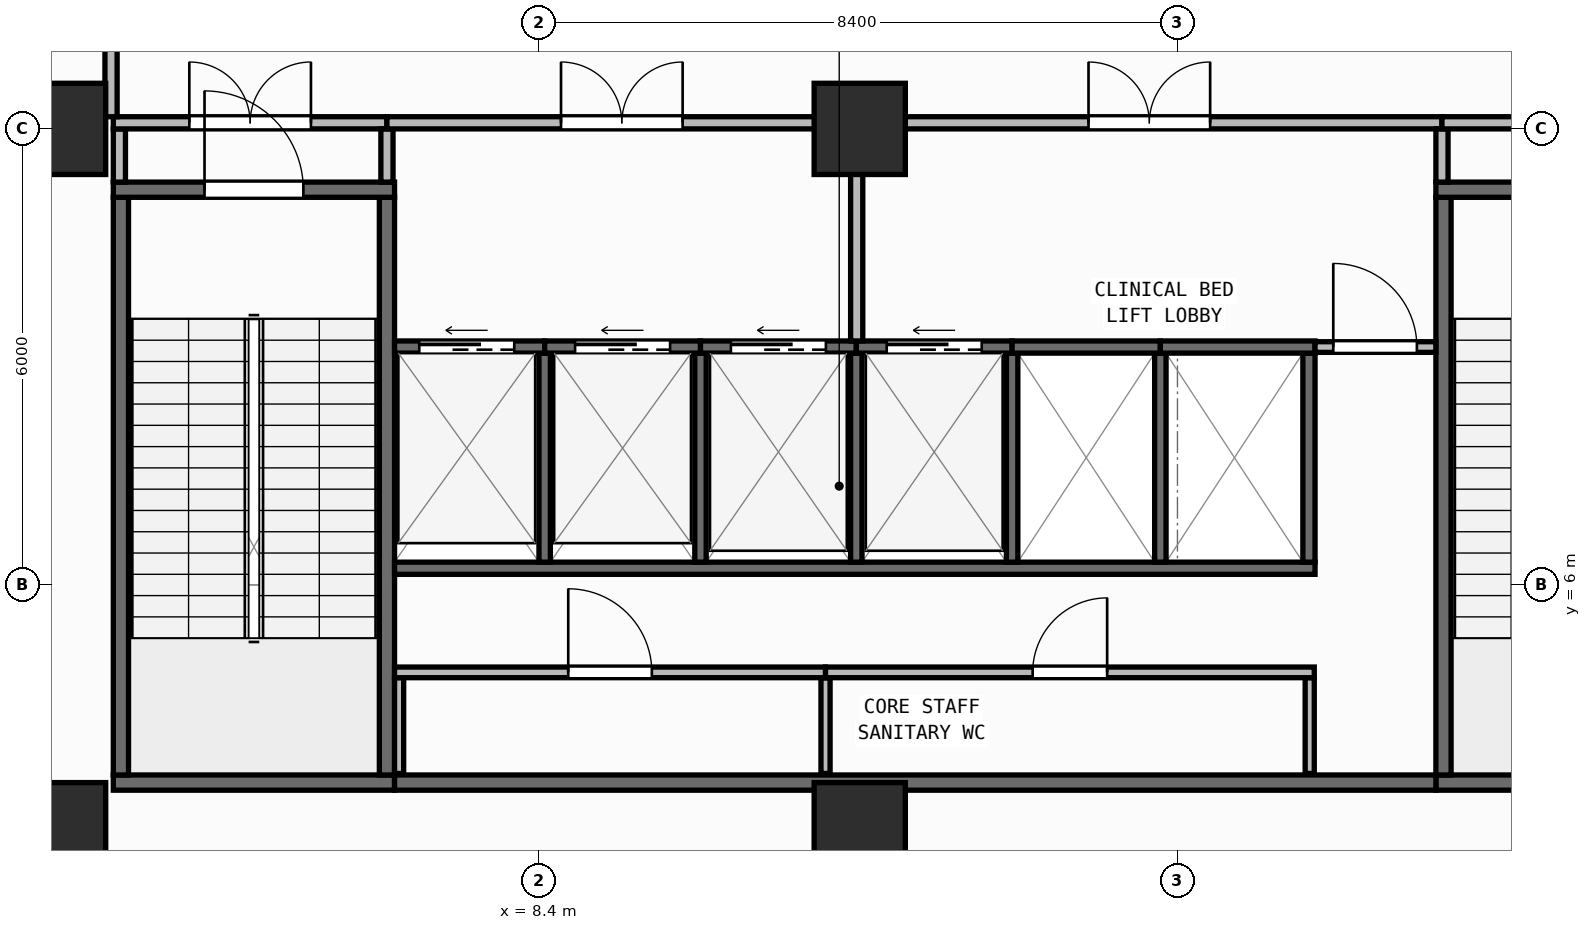
"""IFC4 building model, lengths in metres.
Left out: names, types, materials, properties, quantities, classifications, styles, units other than length and angle.
Written with IfcOpenShell. Run it as: python <this file> out.ifc"""

import sys

from ifc_helpers import new_model, si_unit, direction, frame, frame_2d, origin, origin_2d, place, context, subcontext, project, spatial, rectangle, extrude, element, fill, save


model = new_model("IFC4")
c1 = context("Model", 3, precision=1e-05, world=origin(), true_north=direction((0.0, 1.0)))
c2 = subcontext(c1, "Body", "Model", "MODEL_VIEW")
j1 = project(units=[si_unit("LENGTHUNIT", "METRE"), si_unit("PLANEANGLEUNIT", "RADIAN")], contexts=[c1])
p1 = place(None, origin())
s1 = spatial("IfcSite", under=j1, at=p1, CompositionType="ELEMENT")
p2 = place(p1, origin())
s2 = spatial("IfcBuilding", under=s1, at=p2, CompositionType="ELEMENT")
p3 = place(p2, frame((0.0, 0.0, 174.45)))
s3 = spatial("IfcBuildingStorey", under=s2, at=p3, CompositionType="ELEMENT", Elevation=174.45)
for number, where, z_axis, x_axis in (
    (1, (2.1, 2.8, 0.0), (0.0, 0.0, 1.0), (1.0, 0.0, 0.0)),
    (2, (12.62, 2.8, 0.0), (0.0, 0.0, 1.0), (1.0, 0.0, 0.0)),
    (3, (2.1, 12.0, 0.0), (0.0, 0.0, 1.0), (1.0, 0.0, 0.0)),
    (4, (12.62, 12.0, 0.0), (0.0, 0.0, 1.0), (1.0, 0.0, 0.0)),
):
    element("IfcColumn", number, at=place(p3, frame(where, z_axis=z_axis, x_axis=x_axis)), inside=s3, PredefinedType="COLUMN", context=c2, shape_type="SweptSolid", body=[
        extrude(rectangle(XDim=1.2, YDim=1.2, at=origin_2d()), origin(), (0.0, 0.0, 1.0), 5.8),
    ])
p4 = place(p3, frame((2.8, 3.4, 0.0), z_axis=(0.0, 0.0, 1.0), x_axis=(1.0, 0.0, 0.0)))
e5 = element("IfcWall", 5, at=p4, inside=s3, PredefinedType="SHEAR", context=c2, shape_type="SweptSolid", body=[
    extrude(rectangle(XDim=3.7, YDim=0.2, at=frame_2d((1.85, 0.0))), origin(), (0.0, 0.0, 1.0), 5.56),
])
for number, where, z_axis, x_axis in (
    (6, (2.9, 3.5, 0.0), (0.0, 0.0, 1.0), (0.0, 1.0, 0.0)),
    (7, (6.4, 3.5, 0.0), (0.0, 0.0, 1.0), (0.0, 1.0, 0.0)),
):
    element("IfcWall", number, at=place(p3, frame(where, z_axis=z_axis, x_axis=x_axis)), inside=s3, PredefinedType="SHEAR", context=c2, shape_type="SweptSolid", body=[
        extrude(rectangle(XDim=7.6, YDim=0.2, at=frame_2d((3.8, 0.0))), origin(), (0.0, 0.0, 1.0), 5.56),
    ])
p5 = place(p3, frame((2.8, 11.2, 0.0), z_axis=(0.0, 0.0, 1.0), x_axis=(1.0, 0.0, 0.0)))
e8 = element("IfcWall", 8, at=p5, inside=s3, PredefinedType="SHEAR", context=c2, shape_type="SweptSolid", body=[
    extrude(rectangle(XDim=3.7, YDim=0.2, at=frame_2d((1.85, 0.0))), origin(), (0.0, 0.0, 1.0), 5.56),
])
p6 = place(p5, frame((1.2, 0.0, 0.0)))
e9 = element("IfcOpeningElement", 9, at=p6, cuts=e8, PredefinedType="OPENING", context=c2, shape_type="SweptSolid", body=[
    extrude(rectangle(XDim=1.3, YDim=2.15, at=frame_2d((0.65, 1.075))), frame((0.0, 0.11, 0.0), z_axis=(0.0, -1.0, 0.0), x_axis=(1.0, 0.0, 0.0)), (0.0, 0.0, 1.0), 0.22),
])
p7 = place(p3, frame((20.2, 3.4, 0.0), z_axis=(0.0, 0.0, 1.0), x_axis=(1.0, 0.0, 0.0)))
e10 = element("IfcWall", 10, at=p7, inside=s3, PredefinedType="SHEAR", context=c2, shape_type="SweptSolid", body=[
    extrude(rectangle(XDim=3.7, YDim=0.2, at=frame_2d((1.85, 0.0))), origin(), (0.0, 0.0, 1.0), 5.56),
])
p8 = place(p3, frame((20.3, 3.5, 0.0), z_axis=(0.0, 0.0, 1.0), x_axis=(0.0, 1.0, 0.0)))
e11 = element("IfcWall", 11, at=p8, inside=s3, PredefinedType="SHEAR", context=c2, shape_type="SweptSolid", body=[
    extrude(rectangle(XDim=7.6, YDim=0.2, at=frame_2d((3.8, 0.0))), origin(), (0.0, 0.0, 1.0), 5.56),
])
p9 = place(p3, frame((20.2, 11.2, 0.0), z_axis=(0.0, 0.0, 1.0), x_axis=(1.0, 0.0, 0.0)))
e12 = element("IfcWall", 12, at=p9, inside=s3, PredefinedType="SHEAR", context=c2, shape_type="SweptSolid", body=[
    extrude(rectangle(XDim=3.7, YDim=0.2, at=frame_2d((1.85, 0.0))), origin(), (0.0, 0.0, 1.0), 5.56),
])
p10 = place(p9, frame((1.2, 0.0, 0.0)))
e13 = element("IfcOpeningElement", 13, at=p10, cuts=e12, PredefinedType="OPENING", context=c2, shape_type="SweptSolid", body=[
    extrude(rectangle(XDim=1.3, YDim=2.15, at=frame_2d((0.65, 1.075))), frame((0.0, 0.11, 0.0), z_axis=(0.0, -1.0, 0.0), x_axis=(1.0, 0.0, 0.0)), (0.0, 0.0, 1.0), 0.22),
])
p11 = place(p3, frame((6.5, 3.4, 0.0), z_axis=(0.0, 0.0, 1.0), x_axis=(1.0, 0.0, 0.0)))
e14 = element("IfcWall", 14, at=p11, inside=s3, PredefinedType="SHEAR", context=c2, shape_type="SweptSolid", body=[
    extrude(rectangle(XDim=13.7, YDim=0.2, at=frame_2d((6.85, 0.0))), origin(), (0.0, 0.0, 1.0), 5.56),
])
p12 = place(p3, frame((6.5, 6.22, 0.0), z_axis=(0.0, 0.0, 1.0), x_axis=(1.0, 0.0, 0.0)))
e15 = element("IfcWall", 15, at=p12, inside=s3, PredefinedType="SHEAR", context=c2, shape_type="SweptSolid", body=[
    extrude(rectangle(XDim=12.11, YDim=0.16, at=frame_2d((6.055, 0.0))), origin(), (0.0, 0.0, 1.0), 5.56),
])
p13 = place(p3, frame((18.53, 6.3, 0.0), z_axis=(0.0, 0.0, 1.0), x_axis=(0.0, 1.0, 0.0)))
e16 = element("IfcWall", 16, at=p13, inside=s3, PredefinedType="SHEAR", context=c2, shape_type="SweptSolid", body=[
    extrude(rectangle(XDim=2.75, YDim=0.16, at=frame_2d((1.375, 0.0))), origin(), (0.0, 0.0, 1.0), 5.56),
])
for number, where, z_axis, x_axis in (
    (17, (8.475, 6.3, 0.0), (0.0, 0.0, 1.0), (0.0, 1.0, 0.0)),
    (18, (10.525, 6.3, 0.0), (0.0, 0.0, 1.0), (0.0, 1.0, 0.0)),
    (19, (12.575, 6.3, 0.0), (0.0, 0.0, 1.0), (0.0, 1.0, 0.0)),
    (20, (14.625, 6.3, 0.0), (0.0, 0.0, 1.0), (0.0, 1.0, 0.0)),
    (21, (16.575, 6.3, 0.0), (0.0, 0.0, 1.0), (0.0, 1.0, 0.0)),
):
    element("IfcWall", number, at=place(p3, frame(where, z_axis=z_axis, x_axis=x_axis)), inside=s3, PredefinedType="SHEAR", context=c2, shape_type="SweptSolid", body=[
        extrude(rectangle(XDim=2.75, YDim=0.15, at=frame_2d((1.375, 0.0))), origin(), (0.0, 0.0, 1.0), 5.56),
    ])
p14 = place(p3, frame((6.5, 9.13, 0.0), z_axis=(0.0, 0.0, 1.0), x_axis=(1.0, 0.0, 0.0)))
e22 = element("IfcWall", 22, at=p14, inside=s3, PredefinedType="SHEAR", context=c2, shape_type="SweptSolid", body=[
    extrude(rectangle(XDim=1.975, YDim=0.16, at=frame_2d((0.988, 0.0))), origin(), (0.0, 0.0, 1.0), 5.56),
])
p15 = place(p14, frame((0.325, 0.0, 0.0)))
e23 = element("IfcOpeningElement", 23, at=p15, cuts=e22, PredefinedType="OPENING", context=c2, shape_type="SweptSolid", body=[
    extrude(rectangle(XDim=1.25, YDim=2.15, at=frame_2d((0.625, 1.075))), frame((0.0, 0.09, 0.0), z_axis=(0.0, -1.0, 0.0), x_axis=(1.0, 0.0, 0.0)), (0.0, 0.0, 1.0), 0.18),
])
p16 = place(p3, frame((8.475, 9.13, 0.0), z_axis=(0.0, 0.0, 1.0), x_axis=(1.0, 0.0, 0.0)))
e24 = element("IfcWall", 24, at=p16, inside=s3, PredefinedType="SHEAR", context=c2, shape_type="SweptSolid", body=[
    extrude(rectangle(XDim=2.05, YDim=0.16, at=frame_2d((1.025, 0.0))), origin(), (0.0, 0.0, 1.0), 5.56),
])
p17 = place(p16, frame((0.4, 0.0, 0.0)))
e25 = element("IfcOpeningElement", 25, at=p17, cuts=e24, PredefinedType="OPENING", context=c2, shape_type="SweptSolid", body=[
    extrude(rectangle(XDim=1.25, YDim=2.15, at=frame_2d((0.625, 1.075))), frame((0.0, 0.09, 0.0), z_axis=(0.0, -1.0, 0.0), x_axis=(1.0, 0.0, 0.0)), (0.0, 0.0, 1.0), 0.18),
])
p18 = place(p3, frame((10.525, 9.13, 0.0), z_axis=(0.0, 0.0, 1.0), x_axis=(1.0, 0.0, 0.0)))
e26 = element("IfcWall", 26, at=p18, inside=s3, PredefinedType="SHEAR", context=c2, shape_type="SweptSolid", body=[
    extrude(rectangle(XDim=2.05, YDim=0.16, at=frame_2d((1.025, 0.0))), origin(), (0.0, 0.0, 1.0), 5.56),
])
p19 = place(p18, frame((0.4, 0.0, 0.0)))
e27 = element("IfcOpeningElement", 27, at=p19, cuts=e26, PredefinedType="OPENING", context=c2, shape_type="SweptSolid", body=[
    extrude(rectangle(XDim=1.25, YDim=2.15, at=frame_2d((0.625, 1.075))), frame((0.0, 0.09, 0.0), z_axis=(0.0, -1.0, 0.0), x_axis=(1.0, 0.0, 0.0)), (0.0, 0.0, 1.0), 0.18),
])
p20 = place(p3, frame((12.575, 9.13, 0.0), z_axis=(0.0, 0.0, 1.0), x_axis=(1.0, 0.0, 0.0)))
e28 = element("IfcWall", 28, at=p20, inside=s3, PredefinedType="SHEAR", context=c2, shape_type="SweptSolid", body=[
    extrude(rectangle(XDim=2.05, YDim=0.16, at=frame_2d((1.025, 0.0))), origin(), (0.0, 0.0, 1.0), 5.56),
])
p21 = place(p20, frame((0.4, 0.0, 0.0)))
e29 = element("IfcOpeningElement", 29, at=p21, cuts=e28, PredefinedType="OPENING", context=c2, shape_type="SweptSolid", body=[
    extrude(rectangle(XDim=1.25, YDim=2.15, at=frame_2d((0.625, 1.075))), frame((0.0, 0.09, 0.0), z_axis=(0.0, -1.0, 0.0), x_axis=(1.0, 0.0, 0.0)), (0.0, 0.0, 1.0), 0.18),
])
p22 = place(p3, frame((14.625, 9.13, 0.0), z_axis=(0.0, 0.0, 1.0), x_axis=(1.0, 0.0, 0.0)))
e30 = element("IfcWall", 30, at=p22, inside=s3, PredefinedType="SHEAR", context=c2, shape_type="SweptSolid", body=[
    extrude(rectangle(XDim=1.95, YDim=0.16, at=frame_2d((0.975, 0.0))), origin(), (0.0, 0.0, 1.0), 5.56),
])
p23 = place(p3, frame((16.575, 9.13, 0.0), z_axis=(0.0, 0.0, 1.0), x_axis=(1.0, 0.0, 0.0)))
e31 = element("IfcWall", 31, at=p23, inside=s3, PredefinedType="SHEAR", context=c2, shape_type="SweptSolid", body=[
    extrude(rectangle(XDim=2.035, YDim=0.16, at=frame_2d((1.018, 0.0))), origin(), (0.0, 0.0, 1.0), 5.56),
])
for number, where, z_axis, x_axis in (
    (32, (6.56, 3.52, 0.0), (0.0, 0.0, 1.0), (0.0, 1.0, 0.0)),
    (33, (12.17, 3.52, 0.0), (0.0, 0.0, 1.0), (0.0, 1.0, 0.0)),
    (34, (18.54, 3.52, 0.0), (0.0, 0.0, 1.0), (0.0, 1.0, 0.0)),
):
    element("IfcWall", number, at=place(p3, frame(where, z_axis=z_axis, x_axis=x_axis)), inside=s3, PredefinedType="PARTITIONING", context=c2, shape_type="SweptSolid", body=[
        extrude(rectangle(XDim=1.26, YDim=0.12, at=frame_2d((0.63, 0.0))), origin(), (0.0, 0.0, 1.0), 5.56),
    ])
p24 = place(p3, frame((6.5, 4.85, 0.0), z_axis=(0.0, 0.0, 1.0), x_axis=(1.0, 0.0, 0.0)))
e35 = element("IfcWall", 35, at=p24, inside=s3, PredefinedType="PARTITIONING", context=c2, shape_type="SweptSolid", body=[
    extrude(rectangle(XDim=5.67, YDim=0.14, at=frame_2d((2.835, 0.0))), origin(), (0.0, 0.0, 1.0), 5.56),
])
p25 = place(p24, frame((2.285, 0.0, 0.0)))
e36 = element("IfcOpeningElement", 36, at=p25, cuts=e35, PredefinedType="OPENING", context=c2, shape_type="SweptSolid", body=[
    extrude(rectangle(XDim=1.1, YDim=2.1, at=frame_2d((0.55, 1.05))), frame((0.0, 0.08, 0.0), z_axis=(0.0, -1.0, 0.0), x_axis=(1.0, 0.0, 0.0)), (0.0, 0.0, 1.0), 0.16),
])
p26 = place(p3, frame((12.17, 4.85, 0.0), z_axis=(0.0, 0.0, 1.0), x_axis=(1.0, 0.0, 0.0)))
e37 = element("IfcWall", 37, at=p26, inside=s3, PredefinedType="PARTITIONING", context=c2, shape_type="SweptSolid", body=[
    extrude(rectangle(XDim=6.43, YDim=0.14, at=frame_2d((3.215, 0.0))), origin(), (0.0, 0.0, 1.0), 5.56),
])
p27 = place(p26, frame((2.725, 0.0, 0.0)))
e38 = element("IfcOpeningElement", 38, at=p27, cuts=e37, PredefinedType="OPENING", context=c2, shape_type="SweptSolid", body=[
    extrude(rectangle(XDim=0.98, YDim=2.1, at=frame_2d((0.49, 1.05))), frame((0.0, 0.08, 0.0), z_axis=(0.0, -1.0, 0.0), x_axis=(1.0, 0.0, 0.0)), (0.0, 0.0, 1.0), 0.16),
])
p28 = place(p3, frame((18.61, 9.13, 0.0), z_axis=(0.0, 0.0, 1.0), x_axis=(1.0, 0.0, 0.0)))
e39 = element("IfcWall", 39, at=p28, inside=s3, PredefinedType="PARTITIONING", context=c2, shape_type="SweptSolid", body=[
    extrude(rectangle(XDim=1.59, YDim=0.14, at=frame_2d((0.795, 0.0))), origin(), (0.0, 0.0, 1.0), 5.56),
])
p29 = place(p28, frame((0.24, 0.0, 0.0)))
e40 = element("IfcOpeningElement", 40, at=p29, cuts=e39, PredefinedType="OPENING", context=c2, shape_type="SweptSolid", body=[
    extrude(rectangle(XDim=1.1, YDim=2.1, at=frame_2d((0.55, 1.05))), frame((0.0, 0.08, 0.0), z_axis=(0.0, -1.0, 0.0), x_axis=(1.0, 0.0, 0.0)), (0.0, 0.0, 1.0), 0.16),
])
p30 = place(p3, frame((2.88, 11.3, 0.0), z_axis=(0.0, 0.0, 1.0), x_axis=(0.0, 1.0, 0.0)))
e41 = element("IfcWall", 41, at=p30, inside=s3, PredefinedType="PARTITIONING", context=c2, shape_type="SweptSolid", body=[
    extrude(rectangle(XDim=0.7, YDim=0.16, at=frame_2d((0.35, 0.0))), origin(), (0.0, 0.0, 1.0), 5.56),
])
p31 = place(p3, frame((2.8, 12.08, 0.0), z_axis=(0.0, 0.0, 1.0), x_axis=(1.0, 0.0, 0.0)))
e42 = element("IfcWall", 42, at=p31, inside=s3, PredefinedType="PARTITIONING", context=c2, shape_type="SweptSolid", body=[
    extrude(rectangle(XDim=3.6, YDim=0.16, at=frame_2d((1.8, 0.0))), origin(), (0.0, 0.0, 1.0), 4.835),
])
p32 = place(p31, frame((1.0, 0.0, 0.0)))
e43 = element("IfcOpeningElement", 43, at=p32, cuts=e42, PredefinedType="OPENING", context=c2, shape_type="SweptSolid", body=[
    extrude(rectangle(XDim=1.6, YDim=2.05, at=frame_2d((0.8, 1.025))), frame((0.0, 0.09, 0.0), z_axis=(0.0, -1.0, 0.0), x_axis=(1.0, 0.0, 0.0)), (0.0, 0.0, 1.0), 0.18),
])
p33 = place(p3, frame((6.4, 11.3, 0.0), z_axis=(0.0, 0.0, 1.0), x_axis=(0.0, 1.0, 0.0)))
e44 = element("IfcWall", 44, at=p33, inside=s3, PredefinedType="PARTITIONING", context=c2, shape_type="SweptSolid", body=[
    extrude(rectangle(XDim=0.7, YDim=0.16, at=frame_2d((0.35, 0.0))), origin(), (0.0, 0.0, 1.0), 5.56),
])
p34 = place(p3, frame((6.4, 12.08, 0.0), z_axis=(0.0, 0.0, 1.0), x_axis=(1.0, 0.0, 0.0)))
e45 = element("IfcWall", 45, at=p34, inside=s3, PredefinedType="PARTITIONING", context=c2, shape_type="SweptSolid", body=[
    extrude(rectangle(XDim=6.18, YDim=0.16, at=frame_2d((3.09, 0.0))), origin(), (0.0, 0.0, 1.0), 4.835),
])
p35 = place(p34, frame((2.29, 0.0, 0.0)))
e46 = element("IfcOpeningElement", 46, at=p35, cuts=e45, PredefinedType="OPENING", context=c2, shape_type="SweptSolid", body=[
    extrude(rectangle(XDim=1.6, YDim=2.05, at=frame_2d((0.8, 1.025))), frame((0.0, 0.09, 0.0), z_axis=(0.0, -1.0, 0.0), x_axis=(1.0, 0.0, 0.0)), (0.0, 0.0, 1.0), 0.18),
])
p36 = place(p3, frame((12.58, 9.21, 0.0), z_axis=(0.0, 0.0, 1.0), x_axis=(0.0, 1.0, 0.0)))
e47 = element("IfcWall", 47, at=p36, inside=s3, PredefinedType="PARTITIONING", context=c2, shape_type="SweptSolid", body=[
    extrude(rectangle(XDim=2.79, YDim=0.16, at=frame_2d((1.395, 0.0))), origin(), (0.0, 0.0, 1.0), 5.56),
])
p37 = place(p3, frame((12.58, 12.08, 0.0), z_axis=(0.0, 0.0, 1.0), x_axis=(1.0, 0.0, 0.0)))
e48 = element("IfcWall", 48, at=p37, inside=s3, PredefinedType="PARTITIONING", context=c2, shape_type="SweptSolid", body=[
    extrude(rectangle(XDim=7.7, YDim=0.16, at=frame_2d((3.85, 0.0))), origin(), (0.0, 0.0, 1.0), 4.835),
])
p38 = place(p37, frame((3.05, 0.0, 0.0)))
e49 = element("IfcOpeningElement", 49, at=p38, cuts=e48, PredefinedType="OPENING", context=c2, shape_type="SweptSolid", body=[
    extrude(rectangle(XDim=1.6, YDim=2.05, at=frame_2d((0.8, 1.025))), frame((0.0, 0.09, 0.0), z_axis=(0.0, -1.0, 0.0), x_axis=(1.0, 0.0, 0.0)), (0.0, 0.0, 1.0), 0.18),
])
p39 = place(p3, frame((20.28, 11.3, 0.0), z_axis=(0.0, 0.0, 1.0), x_axis=(0.0, 1.0, 0.0)))
e50 = element("IfcWall", 50, at=p39, inside=s3, PredefinedType="PARTITIONING", context=c2, shape_type="SweptSolid", body=[
    extrude(rectangle(XDim=0.7, YDim=0.16, at=frame_2d((0.35, 0.0))), origin(), (0.0, 0.0, 1.0), 5.56),
])
p40 = place(p3, frame((20.28, 12.08, 0.0), z_axis=(0.0, 0.0, 1.0), x_axis=(1.0, 0.0, 0.0)))
e51 = element("IfcWall", 51, at=p40, inside=s3, PredefinedType="PARTITIONING", context=c2, shape_type="SweptSolid", body=[
    extrude(rectangle(XDim=3.62, YDim=0.16, at=frame_2d((1.81, 0.0))), origin(), (0.0, 0.0, 1.0), 4.835),
])
p41 = place(p40, frame((1.01, 0.0, 0.0)))
e52 = element("IfcOpeningElement", 52, at=p41, cuts=e51, PredefinedType="OPENING", context=c2, shape_type="SweptSolid", body=[
    extrude(rectangle(XDim=1.6, YDim=2.05, at=frame_2d((0.8, 1.025))), frame((0.0, 0.09, 0.0), z_axis=(0.0, -1.0, 0.0), x_axis=(1.0, 0.0, 0.0)), (0.0, 0.0, 1.0), 0.18),
])
p42 = place(p3, frame((2.77, 12.16, 0.0), z_axis=(0.0, 0.0, 1.0), x_axis=(0.0, 1.0, 0.0)))
e53 = element("IfcWall", 53, at=p42, inside=s3, PredefinedType="PARTITIONING", context=c2, shape_type="SweptSolid", body=[
    extrude(rectangle(XDim=16.04, YDim=0.16, at=frame_2d((8.02, 0.0))), origin(), (0.0, 0.0, 1.0), 5.56),
])
p43 = place(p6, origin())
e54 = element("IfcDoor", 54, at=p43, inside=s3, OperationType="SINGLE_SWING_LEFT", PredefinedType="DOOR", context=c2, shape_type="SweptSolid", body=[
    extrude(rectangle(XDim=1.3, YDim=2.15, at=frame_2d((0.65, 1.075))), frame((0.0, 0.025, 0.0), z_axis=(0.0, -1.0, 0.0), x_axis=(1.0, 0.0, 0.0)), (0.0, 0.0, 1.0), 0.05),
])
fill(e9, e54)
p44 = place(p15, origin())
e55 = element("IfcDoor", 55, at=p44, inside=s3, OperationType="SLIDING_TO_LEFT", PredefinedType="DOOR", context=c2, shape_type="SweptSolid", body=[
    extrude(rectangle(XDim=1.25, YDim=2.15, at=frame_2d((0.625, 1.075))), frame((0.0, 0.025, 0.0), z_axis=(0.0, -1.0, 0.0), x_axis=(1.0, 0.0, 0.0)), (0.0, 0.0, 1.0), 0.05),
])
fill(e23, e55)
p45 = place(p17, origin())
e56 = element("IfcDoor", 56, at=p45, inside=s3, OperationType="SLIDING_TO_LEFT", PredefinedType="DOOR", context=c2, shape_type="SweptSolid", body=[
    extrude(rectangle(XDim=1.25, YDim=2.15, at=frame_2d((0.625, 1.075))), frame((0.0, 0.025, 0.0), z_axis=(0.0, -1.0, 0.0), x_axis=(1.0, 0.0, 0.0)), (0.0, 0.0, 1.0), 0.05),
])
fill(e25, e56)
p46 = place(p19, origin())
e57 = element("IfcDoor", 57, at=p46, inside=s3, OperationType="SLIDING_TO_LEFT", PredefinedType="DOOR", context=c2, shape_type="SweptSolid", body=[
    extrude(rectangle(XDim=1.25, YDim=2.15, at=frame_2d((0.625, 1.075))), frame((0.0, 0.025, 0.0), z_axis=(0.0, -1.0, 0.0), x_axis=(1.0, 0.0, 0.0)), (0.0, 0.0, 1.0), 0.05),
])
fill(e27, e57)
p47 = place(p21, origin())
e58 = element("IfcDoor", 58, at=p47, inside=s3, OperationType="SLIDING_TO_LEFT", PredefinedType="DOOR", context=c2, shape_type="SweptSolid", body=[
    extrude(rectangle(XDim=1.25, YDim=2.15, at=frame_2d((0.625, 1.075))), frame((0.0, 0.025, 0.0), z_axis=(0.0, -1.0, 0.0), x_axis=(1.0, 0.0, 0.0)), (0.0, 0.0, 1.0), 0.05),
])
fill(e29, e58)
p48 = place(p25, origin())
e59 = element("IfcDoor", 59, at=p48, inside=s3, OperationType="SINGLE_SWING_LEFT", PredefinedType="DOOR", context=c2, shape_type="SweptSolid", body=[
    extrude(rectangle(XDim=1.1, YDim=2.1, at=frame_2d((0.55, 1.05))), frame((0.0, 0.025, 0.0), z_axis=(0.0, -1.0, 0.0), x_axis=(1.0, 0.0, 0.0)), (0.0, 0.0, 1.0), 0.05),
])
fill(e36, e59)
p49 = place(p27, origin())
e60 = element("IfcDoor", 60, at=p49, inside=s3, OperationType="SINGLE_SWING_RIGHT", PredefinedType="DOOR", context=c2, shape_type="SweptSolid", body=[
    extrude(rectangle(XDim=0.98, YDim=2.1, at=frame_2d((0.49, 1.05))), frame((0.0, 0.025, 0.0), z_axis=(0.0, -1.0, 0.0), x_axis=(1.0, 0.0, 0.0)), (0.0, 0.0, 1.0), 0.05),
])
fill(e38, e60)
p50 = place(p29, origin())
e61 = element("IfcDoor", 61, at=p50, inside=s3, OperationType="SINGLE_SWING_LEFT", PredefinedType="DOOR", context=c2, shape_type="SweptSolid", body=[
    extrude(rectangle(XDim=1.1, YDim=2.1, at=frame_2d((0.55, 1.05))), frame((0.0, 0.025, 0.0), z_axis=(0.0, -1.0, 0.0), x_axis=(1.0, 0.0, 0.0)), (0.0, 0.0, 1.0), 0.05),
])
fill(e40, e61)
p51 = place(p32, origin())
e62 = element("IfcDoor", 62, at=p51, inside=s3, OperationType="DOUBLE_DOOR_SINGLE_SWING", PredefinedType="DOOR", context=c2, shape_type="SweptSolid", body=[
    extrude(rectangle(XDim=1.6, YDim=2.05, at=frame_2d((0.8, 1.025))), frame((0.0, 0.025, 0.0), z_axis=(0.0, -1.0, 0.0), x_axis=(1.0, 0.0, 0.0)), (0.0, 0.0, 1.0), 0.05),
])
fill(e43, e62)
p52 = place(p35, origin())
e63 = element("IfcDoor", 63, at=p52, inside=s3, OperationType="DOUBLE_DOOR_SINGLE_SWING", PredefinedType="DOOR", context=c2, shape_type="SweptSolid", body=[
    extrude(rectangle(XDim=1.6, YDim=2.05, at=frame_2d((0.8, 1.025))), frame((0.0, 0.025, 0.0), z_axis=(0.0, -1.0, 0.0), x_axis=(1.0, 0.0, 0.0)), (0.0, 0.0, 1.0), 0.05),
])
fill(e46, e63)
p53 = place(p38, origin())
e64 = element("IfcDoor", 64, at=p53, inside=s3, OperationType="DOUBLE_DOOR_SINGLE_SWING", PredefinedType="DOOR", context=c2, shape_type="SweptSolid", body=[
    extrude(rectangle(XDim=1.6, YDim=2.05, at=frame_2d((0.8, 1.025))), frame((0.0, 0.025, 0.0), z_axis=(0.0, -1.0, 0.0), x_axis=(1.0, 0.0, 0.0)), (0.0, 0.0, 1.0), 0.05),
])
fill(e49, e64)
save(model, sys.argv[1])
